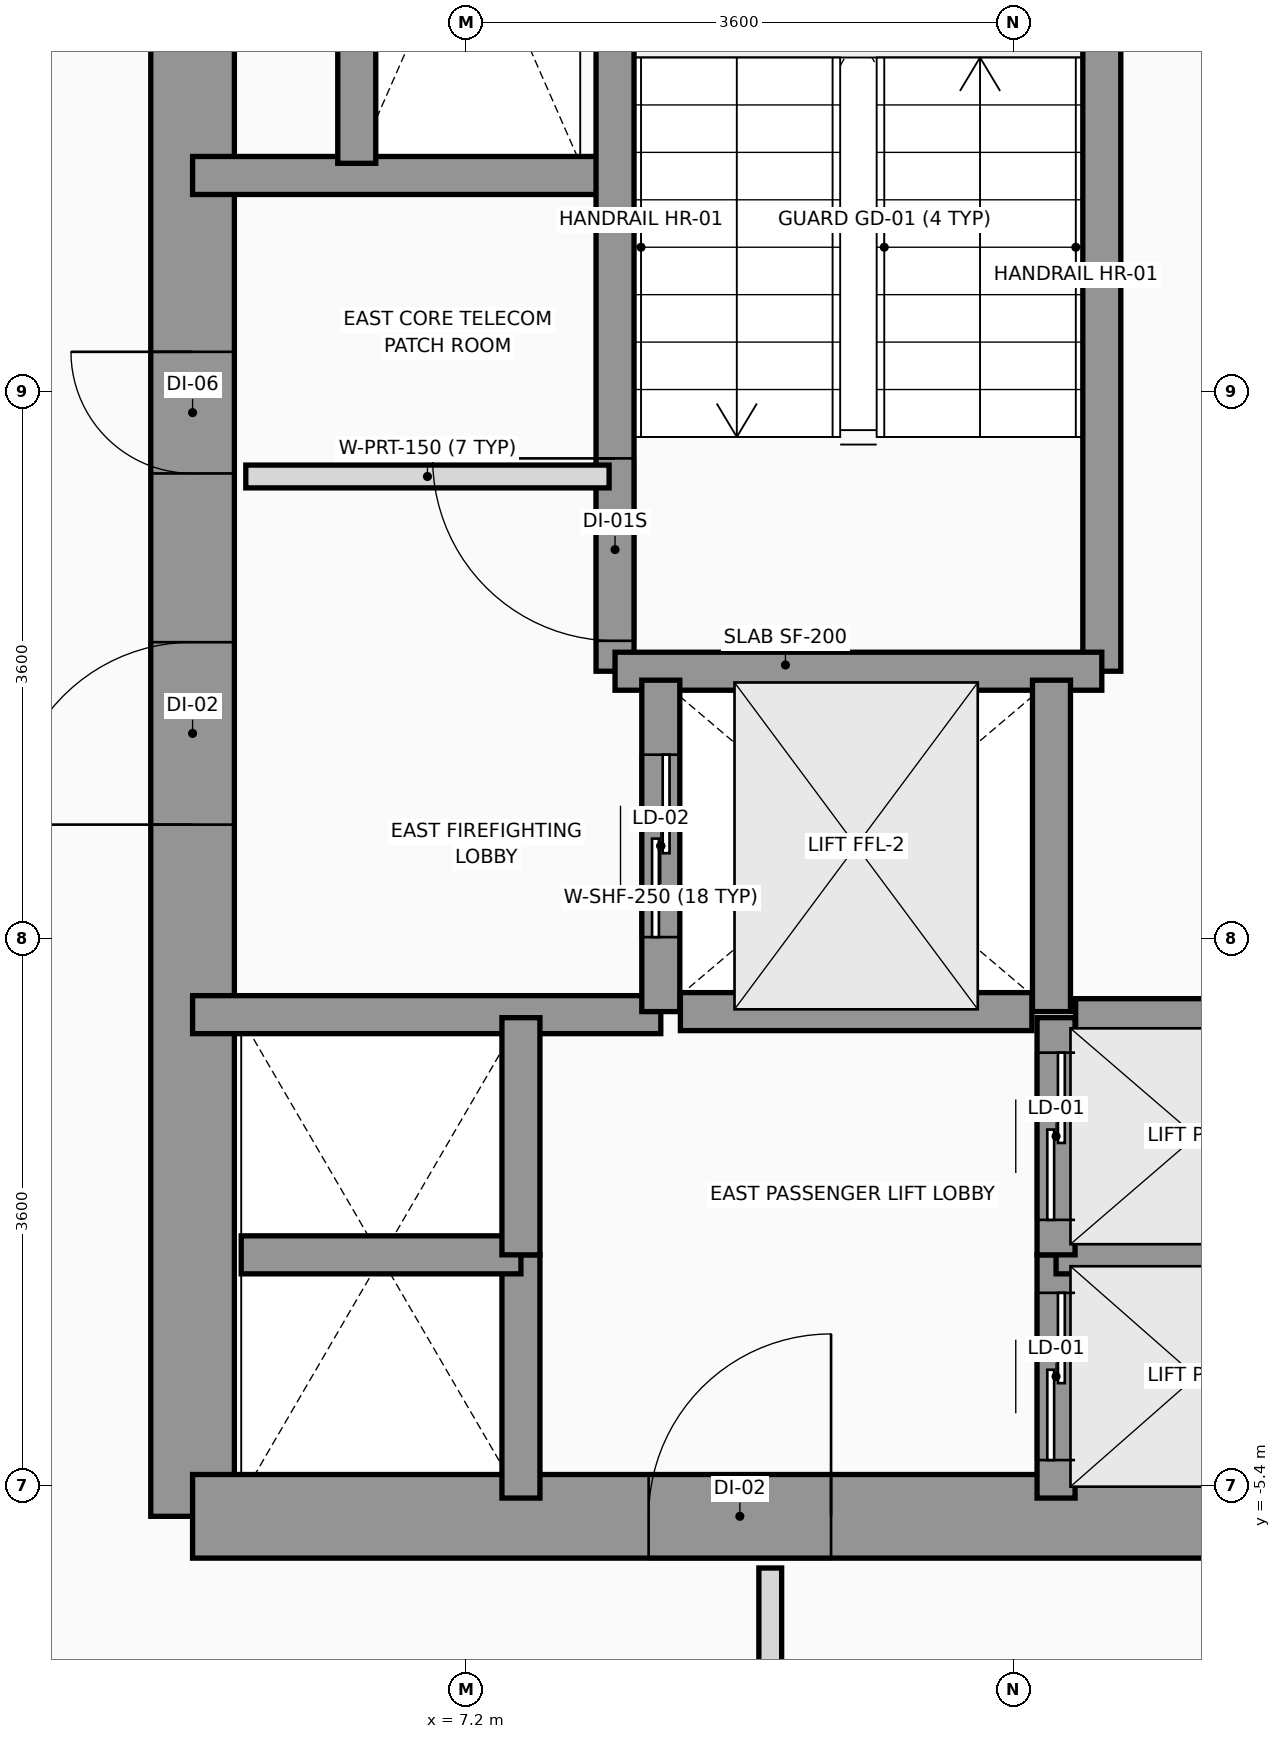
"""IFC4 building model, lengths in metres.
Left out: names, types, materials, properties, quantities, classifications, styles, units other than length and angle.
Written with IfcOpenShell. Run it as: python <this file> out.ifc"""

import sys

from ifc_helpers import new_model, si_unit, direction, frame, frame_2d, origin, place, context, subcontext, project, spatial, rectangle, extrude, source, transform, mapped, element, fill, save


model = new_model("IFC4")
c1 = context("Model", 3, precision=1e-05, world=origin(), true_north=direction((0.0, 1.0)))
c2 = subcontext(c1, "Body", "Model", "MODEL_VIEW")
j1 = project(units=[si_unit("LENGTHUNIT", "METRE"), si_unit("PLANEANGLEUNIT", "RADIAN")], contexts=[c1])
p1 = place(None, origin())
s1 = spatial("IfcSite", under=j1, at=p1, CompositionType="ELEMENT")
p2 = place(p1, origin())
s2 = spatial("IfcBuilding", under=s1, at=p2, CompositionType="ELEMENT")
p3 = place(p2, frame((0.0, 0.0, 30.6)))
s3 = spatial("IfcBuildingStorey", under=s2, at=p3, CompositionType="ELEMENT", Elevation=30.6)
p4 = place(p3, frame((5.4, -5.6, 0.0), z_axis=(0.0, 0.0, 1.0), x_axis=(0.0, 1.0, 0.0)))
e1 = element("IfcWall", 1, at=p4, inside=s3, PredefinedType="SHEAR", context=c2, shape_type="SweptSolid", body=[
    extrude(rectangle(XDim=12.5, YDim=0.55, at=frame_2d((6.25, 0.0))), origin(), (0.0, 0.0, 1.0), 3.2),
])
p5 = place(p4, frame((4.55, 0.0, 0.0)))
e2 = element("IfcOpeningElement", 2, at=p5, cuts=e1, PredefinedType="OPENING", context=c2, shape_type="SweptSolid", body=[
    extrude(rectangle(XDim=1.2, YDim=2.2, at=frame_2d((0.6, 1.1))), frame((0.0, 0.285, 0.0), z_axis=(0.0, -1.0, 0.0), x_axis=(1.0, 0.0, 0.0)), (0.0, 0.0, 1.0), 0.57),
])
p6 = place(p4, frame((6.86, 0.0, 0.0)))
e3 = element("IfcOpeningElement", 3, at=p6, cuts=e1, PredefinedType="OPENING", context=c2, shape_type="SweptSolid", body=[
    extrude(rectangle(XDim=0.8, YDim=2.1, at=frame_2d((0.4, 1.05))), frame((0.0, 0.285, 0.0), z_axis=(0.0, -1.0, 0.0), x_axis=(1.0, 0.0, 0.0)), (0.0, 0.0, 1.0), 0.57),
])
p7 = place(p3, frame((5.4, -5.6, 0.0), z_axis=(0.0, 0.0, 1.0), x_axis=(1.0, 0.0, 0.0)))
e4 = element("IfcWall", 4, at=p7, inside=s3, PredefinedType="SHEAR", context=c2, shape_type="SweptSolid", body=[
    extrude(rectangle(XDim=7.8, YDim=0.55, at=frame_2d((3.9, 0.0))), origin(), (0.0, 0.0, 1.0), 3.2),
])
p8 = place(p7, frame((3.0, 0.0, 0.0)))
e5 = element("IfcOpeningElement", 5, at=p8, cuts=e4, PredefinedType="OPENING", context=c2, shape_type="SweptSolid", body=[
    extrude(rectangle(XDim=1.2, YDim=2.2, at=frame_2d((0.6, 1.1))), frame((0.0, 0.285, 0.0), z_axis=(0.0, -1.0, 0.0), x_axis=(1.0, 0.0, 0.0)), (0.0, 0.0, 1.0), 0.57),
])
p9 = place(p3, frame((5.4, 3.22, 0.0), z_axis=(0.0, 0.0, 1.0), x_axis=(1.0, 0.0, 0.0)))
e6 = element("IfcWall", 6, at=p9, inside=s3, PredefinedType="SOLIDWALL", context=c2, shape_type="SweptSolid", body=[
    extrude(rectangle(XDim=2.78, YDim=0.25, at=frame_2d((1.39, 0.0))), origin(), (0.0, 0.0, 1.0), 3.2),
])
p10 = place(p3, frame((5.4, -2.3, 0.0), z_axis=(0.0, 0.0, 1.0), x_axis=(1.0, 0.0, 0.0)))
e7 = element("IfcWall", 7, at=p10, inside=s3, PredefinedType="SOLIDWALL", context=c2, shape_type="SweptSolid", body=[
    extrude(rectangle(XDim=3.08, YDim=0.25, at=frame_2d((1.54, 0.0))), origin(), (0.0, 0.0, 1.0), 3.2),
])
p11 = place(p3, frame((8.179, -0.041, 0.0), z_axis=(0.0, 0.0, 1.0), x_axis=(0.0, 1.0, 0.0)))
e8 = element("IfcWall", 8, at=p11, inside=s3, PredefinedType="SOLIDWALL", context=c2, shape_type="SweptSolid", body=[
    extrude(rectangle(XDim=6.941, YDim=0.25, at=frame_2d((3.47, 0.0))), origin(), (0.0, 0.0, 1.0), 3.2),
])
p12 = place(p11, frame((0.2, 0.0, 0.0)))
e9 = element("IfcOpeningElement", 9, at=p12, cuts=e8, PredefinedType="OPENING", context=c2, shape_type="SweptSolid", body=[
    extrude(rectangle(XDim=1.2, YDim=2.2, at=frame_2d((0.6, 1.1))), frame((0.0, 0.135, 0.0), z_axis=(0.0, -1.0, 0.0), x_axis=(1.0, 0.0, 0.0)), (0.0, 0.0, 1.0), 0.27),
])
p13 = place(p3, frame((11.381, -0.041, 0.0), z_axis=(0.0, 0.0, 1.0), x_axis=(0.0, 1.0, 0.0)))
e10 = element("IfcWall", 10, at=p13, inside=s3, PredefinedType="SOLIDWALL", context=c2, shape_type="SweptSolid", body=[
    extrude(rectangle(XDim=6.941, YDim=0.25, at=frame_2d((3.47, 0.0))), origin(), (0.0, 0.0, 1.0), 3.2),
])
p14 = place(p3, frame((8.179, -0.041, 0.0), z_axis=(0.0, 0.0, 1.0), x_axis=(1.0, 0.0, 0.0)))
e11 = element("IfcWall", 11, at=p14, inside=s3, PredefinedType="SOLIDWALL", context=c2, shape_type="SweptSolid", body=[
    extrude(rectangle(XDim=3.202, YDim=0.25, at=frame_2d((1.601, 0.0))), origin(), (0.0, 0.0, 1.0), 3.2),
])
p15 = place(p3, frame((8.48, -2.28, 0.0), z_axis=(0.0, 0.0, 1.0), x_axis=(0.0, 1.0, 0.0)))
e12 = element("IfcWall", 12, at=p15, inside=s3, PredefinedType="SOLIDWALL", context=c2, shape_type="SweptSolid", body=[
    extrude(rectangle(XDim=2.18, YDim=0.25, at=frame_2d((1.09, 0.0))), origin(), (0.0, 0.0, 1.0), 3.2),
])
p16 = place(p15, frame((0.49, 0.0, 0.0)))
e13 = element("IfcOpeningElement", 13, at=p16, cuts=e12, PredefinedType="OPENING", context=c2, shape_type="SweptSolid", body=[
    extrude(rectangle(XDim=1.2, YDim=2.2, at=frame_2d((0.6, 1.1))), frame((0.0, 0.135, 0.0), z_axis=(0.0, -1.0, 0.0), x_axis=(1.0, 0.0, 0.0)), (0.0, 0.0, 1.0), 0.27),
])
p17 = place(p3, frame((11.05, -2.28, 0.0), z_axis=(0.0, 0.0, 1.0), x_axis=(0.0, 1.0, 0.0)))
e14 = element("IfcWall", 14, at=p17, inside=s3, PredefinedType="SOLIDWALL", context=c2, shape_type="SweptSolid", body=[
    extrude(rectangle(XDim=2.18, YDim=0.25, at=frame_2d((1.09, 0.0))), origin(), (0.0, 0.0, 1.0), 3.2),
])
p18 = place(p3, frame((8.609, -2.28, 0.0), z_axis=(0.0, 0.0, 1.0), x_axis=(1.0, 0.0, 0.0)))
e15 = element("IfcWall", 15, at=p18, inside=s3, PredefinedType="SOLIDWALL", context=c2, shape_type="SweptSolid", body=[
    extrude(rectangle(XDim=2.312, YDim=0.25, at=frame_2d((1.156, 0.0))), origin(), (0.0, 0.0, 1.0), 3.2),
])
p19 = place(p3, frame((11.08, -5.48, 0.0), z_axis=(0.0, 0.0, 1.0), x_axis=(0.0, 1.0, 0.0)))
e16 = element("IfcWall", 16, at=p19, inside=s3, PredefinedType="SOLIDWALL", context=c2, shape_type="SweptSolid", body=[
    extrude(rectangle(XDim=1.6, YDim=0.25, at=frame_2d((0.8, 0.0))), origin(), (0.0, 0.0, 1.0), 3.2),
])
p20 = place(p19, frame((0.25, 0.0, 0.0)))
e17 = element("IfcOpeningElement", 17, at=p20, cuts=e16, PredefinedType="OPENING", context=c2, shape_type="SweptSolid", body=[
    extrude(rectangle(XDim=1.1, YDim=2.2, at=frame_2d((0.55, 1.1))), frame((0.0, 0.135, 0.0), z_axis=(0.0, -1.0, 0.0), x_axis=(1.0, 0.0, 0.0)), (0.0, 0.0, 1.0), 0.27),
])
p21 = place(p3, frame((11.08, -3.88, 0.0), z_axis=(0.0, 0.0, 1.0), x_axis=(1.0, 0.0, 0.0)))
e18 = element("IfcWall", 18, at=p21, inside=s3, PredefinedType="SOLIDWALL", context=c2, shape_type="SweptSolid", body=[
    extrude(rectangle(XDim=1.84, YDim=0.25, at=frame_2d((0.92, 0.0))), origin(), (0.0, 0.0, 1.0), 3.2),
])
p22 = place(p3, frame((11.08, -3.88, 0.0), z_axis=(0.0, 0.0, 1.0), x_axis=(0.0, 1.0, 0.0)))
e19 = element("IfcWall", 19, at=p22, inside=s3, PredefinedType="SOLIDWALL", context=c2, shape_type="SweptSolid", body=[
    extrude(rectangle(XDim=1.56, YDim=0.25, at=frame_2d((0.78, 0.0))), origin(), (0.0, 0.0, 1.0), 3.2),
])
p23 = place(p22, frame((0.23, 0.0, 0.0)))
e20 = element("IfcOpeningElement", 20, at=p23, cuts=e19, PredefinedType="OPENING", context=c2, shape_type="SweptSolid", body=[
    extrude(rectangle(XDim=1.1, YDim=2.2, at=frame_2d((0.55, 1.1))), frame((0.0, 0.135, 0.0), z_axis=(0.0, -1.0, 0.0), x_axis=(1.0, 0.0, 0.0)), (0.0, 0.0, 1.0), 0.27),
])
p24 = place(p3, frame((11.209, -2.32, 0.0), z_axis=(0.0, 0.0, 1.0), x_axis=(1.0, 0.0, 0.0)))
e21 = element("IfcWall", 21, at=p24, inside=s3, PredefinedType="SOLIDWALL", context=c2, shape_type="SweptSolid", body=[
    extrude(rectangle(XDim=1.582, YDim=0.25, at=frame_2d((0.791, 0.0))), origin(), (0.0, 0.0, 1.0), 3.2),
])
p25 = place(p3, frame((7.56, -5.48, 0.0), z_axis=(0.0, 0.0, 1.0), x_axis=(0.0, 1.0, 0.0)))
e22 = element("IfcWall", 22, at=p25, inside=s3, PredefinedType="SOLIDWALL", context=c2, shape_type="SweptSolid", body=[
    extrude(rectangle(XDim=1.6, YDim=0.25, at=frame_2d((0.8, 0.0))), origin(), (0.0, 0.0, 1.0), 3.2),
])
p26 = place(p3, frame((5.72, -3.88, 0.0), z_axis=(0.0, 0.0, 1.0), x_axis=(1.0, 0.0, 0.0)))
e23 = element("IfcWall", 23, at=p26, inside=s3, PredefinedType="SOLIDWALL", context=c2, shape_type="SweptSolid", body=[
    extrude(rectangle(XDim=1.84, YDim=0.25, at=frame_2d((0.92, 0.0))), origin(), (0.0, 0.0, 1.0), 3.2),
])
p27 = place(p3, frame((7.56, -3.88, 0.0), z_axis=(0.0, 0.0, 1.0), x_axis=(0.0, 1.0, 0.0)))
e24 = element("IfcWall", 24, at=p27, inside=s3, PredefinedType="SOLIDWALL", context=c2, shape_type="SweptSolid", body=[
    extrude(rectangle(XDim=1.56, YDim=0.25, at=frame_2d((0.78, 0.0))), origin(), (0.0, 0.0, 1.0), 3.2),
])
p28 = place(p3, frame((6.48, 3.3, 0.0), z_axis=(0.0, 0.0, 1.0), x_axis=(0.0, 1.0, 0.0)))
e25 = element("IfcWall", 25, at=p28, inside=s3, PredefinedType="SOLIDWALL", context=c2, shape_type="SweptSolid", body=[
    extrude(rectangle(XDim=1.68, YDim=0.25, at=frame_2d((0.84, 0.0))), origin(), (0.0, 0.0, 1.0), 3.2),
])
p29 = place(p3, frame((5.75, 1.24, 0.0), z_axis=(0.0, 0.0, 1.0), x_axis=(1.0, 0.0, 0.0)))
e26 = element("IfcWall", 26, at=p29, inside=s3, PredefinedType="PARTITIONING", context=c2, shape_type="SweptSolid", body=[
    extrude(rectangle(XDim=2.39, YDim=0.15, at=frame_2d((1.195, 0.0))), origin(), (0.0, 0.0, 1.0), 2.3),
])
p30 = place(p3, frame((9.2, -15.68, 0.0), z_axis=(0.0, 0.0, 1.0), x_axis=(0.0, 1.0, 0.0)))
e27 = element("IfcWall", 27, at=p30, inside=s3, PredefinedType="PARTITIONING", context=c2, shape_type="SweptSolid", body=[
    extrude(rectangle(XDim=9.74, YDim=0.15, at=frame_2d((4.87, 0.0))), origin(), (0.0, 0.0, 1.0), 2.65),
])
m1 = source(origin(), c2, "Body", "SweptSolid", [
    extrude(rectangle(XDim=1.2, YDim=2.2, at=frame_2d((0.6, 1.1))), frame((0.0, 0.025, 0.0), z_axis=(0.0, -1.0, 0.0), x_axis=(1.0, 0.0, 0.0)), (0.0, 0.0, 1.0), 0.05),
])
p31 = place(p12, origin())
e28 = element("IfcDoor", 28, at=p31, inside=s3, OperationType="SINGLE_SWING_RIGHT", PredefinedType="DOOR", context=c2, shape_type="MappedRepresentation", body=[
    mapped(m1, transform((0.0, 0.0, 0.0), x_axis=(1.0, 0.0, 0.0), y_axis=(0.0, 1.0, 0.0), z_axis=(0.0, 0.0, 1.0), scale=1.0)),
])
fill(e9, e28)
p32 = place(p5, origin())
e29 = element("IfcDoor", 29, at=p32, inside=s3, OperationType="SINGLE_SWING_LEFT", PredefinedType="DOOR", context=c2, shape_type="MappedRepresentation", body=[
    mapped(m1, transform((0.0, 0.0, 0.0), x_axis=(1.0, 0.0, 0.0), y_axis=(0.0, 1.0, 0.0), z_axis=(0.0, 0.0, 1.0), scale=1.0)),
])
fill(e2, e29)
p33 = place(p8, origin())
e30 = element("IfcDoor", 30, at=p33, inside=s3, OperationType="SINGLE_SWING_RIGHT", PredefinedType="DOOR", context=c2, shape_type="MappedRepresentation", body=[
    mapped(m1, transform((0.0, 0.0, 0.0), x_axis=(1.0, 0.0, 0.0), y_axis=(0.0, 1.0, 0.0), z_axis=(0.0, 0.0, 1.0), scale=1.0)),
])
fill(e5, e30)
m2 = source(origin(), c2, "Body", "SweptSolid", [
    extrude(rectangle(XDim=0.8, YDim=2.1, at=frame_2d((0.4, 1.05))), frame((0.0, 0.025, 0.0), z_axis=(0.0, -1.0, 0.0), x_axis=(1.0, 0.0, 0.0)), (0.0, 0.0, 1.0), 0.05),
])
p34 = place(p6, origin())
e31 = element("IfcDoor", 31, at=p34, inside=s3, OperationType="SINGLE_SWING_RIGHT", PredefinedType="DOOR", context=c2, shape_type="MappedRepresentation", body=[
    mapped(m2, transform((0.0, 0.0, 0.0), x_axis=(1.0, 0.0, 0.0), y_axis=(0.0, 1.0, 0.0), z_axis=(0.0, 0.0, 1.0), scale=1.0)),
])
fill(e3, e31)
p35 = place(p16, origin())
e32 = element("IfcDoor", 32, at=p35, inside=s3, OperationType="SLIDING_TO_RIGHT", PredefinedType="DOOR", context=c2, shape_type="MappedRepresentation", body=[
    mapped(m1, transform((0.0, 0.0, 0.0), x_axis=(1.0, 0.0, 0.0), y_axis=(0.0, 1.0, 0.0), z_axis=(0.0, 0.0, 1.0), scale=1.0)),
])
fill(e13, e32)
m3 = source(origin(), c2, "Body", "SweptSolid", [
    extrude(rectangle(XDim=1.1, YDim=2.2, at=frame_2d((0.55, 1.1))), frame((0.0, 0.025, 0.0), z_axis=(0.0, -1.0, 0.0), x_axis=(1.0, 0.0, 0.0)), (0.0, 0.0, 1.0), 0.05),
])
p36 = place(p20, origin())
e33 = element("IfcDoor", 33, at=p36, inside=s3, OperationType="SLIDING_TO_LEFT", PredefinedType="DOOR", context=c2, shape_type="MappedRepresentation", body=[
    mapped(m3, transform((0.0, 0.0, 0.0), x_axis=(1.0, 0.0, 0.0), y_axis=(0.0, 1.0, 0.0), z_axis=(0.0, 0.0, 1.0), scale=1.0)),
])
fill(e17, e33)
p37 = place(p23, origin())
e34 = element("IfcDoor", 34, at=p37, inside=s3, OperationType="SLIDING_TO_LEFT", PredefinedType="DOOR", context=c2, shape_type="MappedRepresentation", body=[
    mapped(m3, transform((0.0, 0.0, 0.0), x_axis=(1.0, 0.0, 0.0), y_axis=(0.0, 1.0, 0.0), z_axis=(0.0, 0.0, 1.0), scale=1.0)),
])
fill(e20, e34)
save(model, sys.argv[1])
